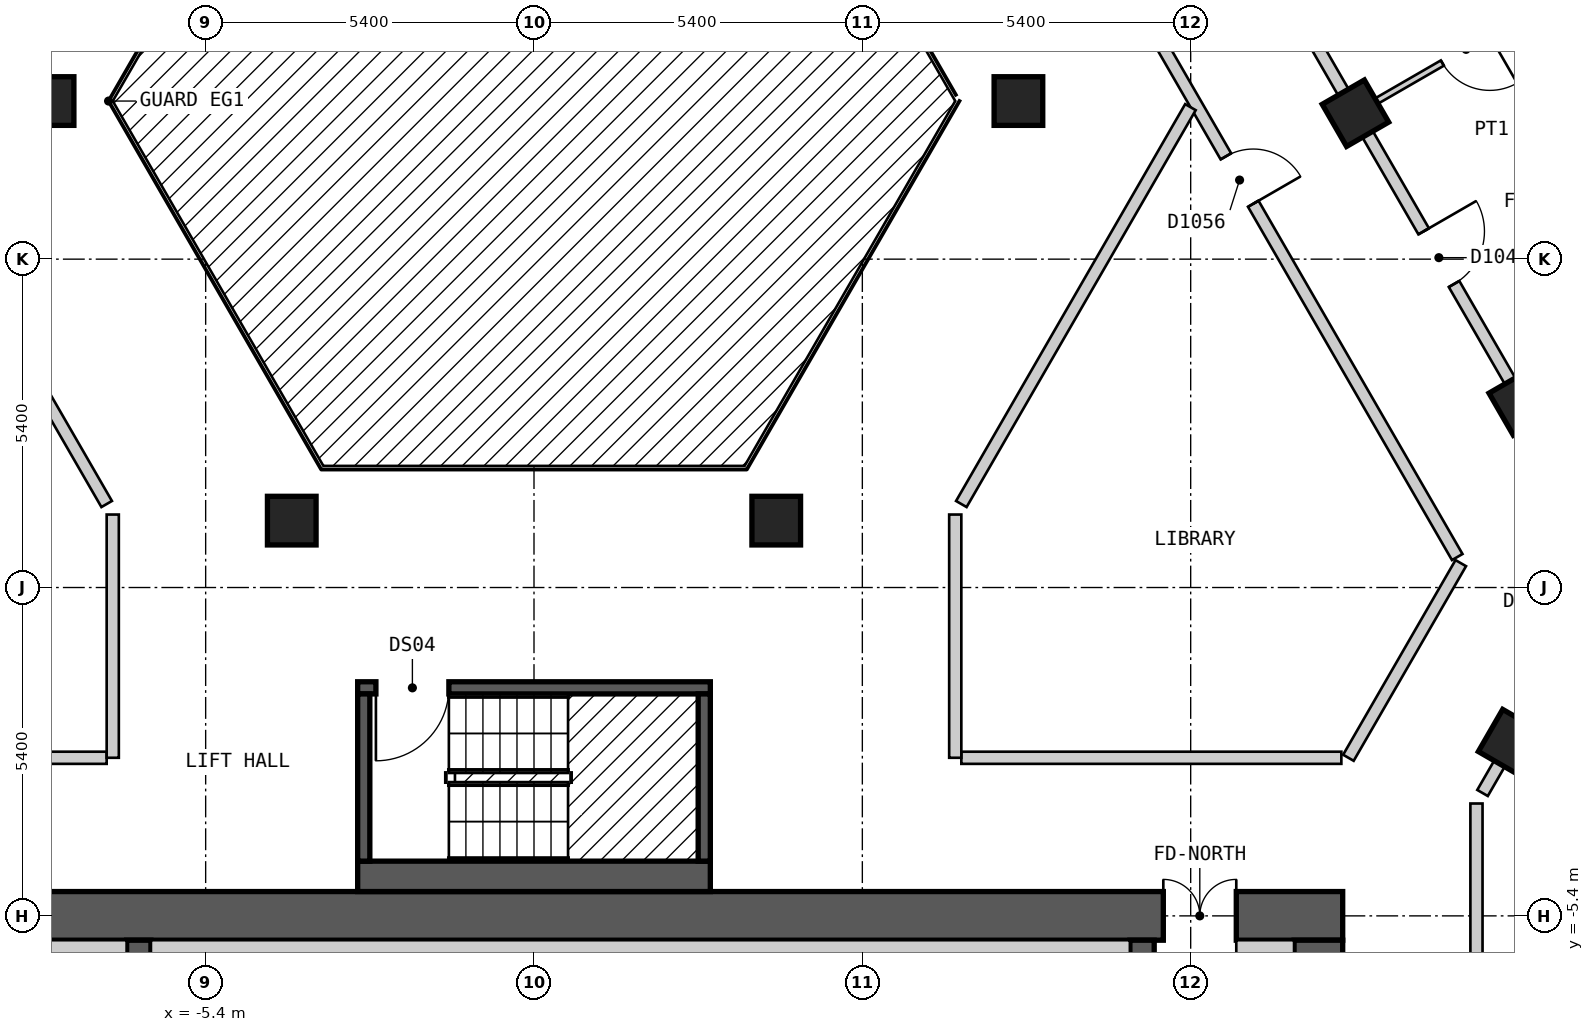
"""IFC4 building model, lengths in metres.
Left out: names, types, materials, properties, quantities, classifications, styles, units other than length and angle.
Written with IfcOpenShell. Run it as: python <this file> out.ifc"""

import sys

from ifc_helpers import new_model, si_unit, direction, frame, frame_2d, origin, origin_2d, place, context, subcontext, project, spatial, polyline, rectangle, outline, extrude, element, fill, save


model = new_model("IFC4")
c1 = context("Model", 3, precision=1e-05, world=origin(), true_north=direction((0.0, 1.0)))
c2 = subcontext(c1, "Body", "Model", "MODEL_VIEW")
j1 = project(units=[si_unit("LENGTHUNIT", "METRE"), si_unit("PLANEANGLEUNIT", "RADIAN")], contexts=[c1])
p1 = place(None, origin())
s1 = spatial("IfcSite", under=j1, at=p1, CompositionType="ELEMENT")
p2 = place(p1, origin())
s2 = spatial("IfcBuilding", under=s1, at=p2, CompositionType="ELEMENT")
p3 = place(p2, frame((0.0, 0.0, 120.6)))
s3 = spatial("IfcBuildingStorey", under=s2, at=p3, CompositionType="ELEMENT", Elevation=120.6)
for number, where, z_axis, x_axis in (
    (1, (16.078, -2.551, 0.0), (0.0, 0.0, 1.0), (0.5, 0.866, 0.0)),
    (2, (16.253, 3.05, 0.0), (0.0, 0.0, 1.0), (-0.5, 0.866, 0.0)),
    (3, (3.984, 1.1, 0.0), (0.0, 0.0, 1.0), (1.0, 0.0, 0.0)),
    (4, (13.51, 7.8, 0.0), (0.0, 0.0, 1.0), (-0.5, 0.866, 0.0)),
    (5, (7.967, 8.0, 0.0), (0.0, 0.0, 1.0), (1.0, 0.0, 0.0)),
    (6, (-7.967, 8.0, 0.0), (0.0, 0.0, 1.0), (1.0, 0.0, 0.0)),
    (7, (-3.984, 1.1, 0.0), (0.0, 0.0, 1.0), (1.0, 0.0, 0.0)),
):
    element("IfcColumn", number, at=place(p3, frame(where, z_axis=z_axis, x_axis=x_axis)), inside=s3, PredefinedType="COLUMN", context=c2, shape_type="SweptSolid", body=[
        extrude(rectangle(XDim=0.8, YDim=0.8, at=origin_2d()), origin(), (0.0, 0.0, 1.0), 3.0),
    ])
p4 = place(p3, frame((-13.3, -5.4, 0.0), z_axis=(0.0, 0.0, 1.0), x_axis=(1.0, 0.0, 0.0)))
e8 = element("IfcWall", 8, at=p4, inside=s3, PredefinedType="SHEAR", context=c2, shape_type="SweptSolid", body=[
    extrude(rectangle(XDim=26.6, YDim=0.8, at=frame_2d((13.3, 0.0))), origin(), (0.0, 0.0, 1.0), 2.7),
])
p5 = place(p4, frame((23.65, 0.0, 0.0)))
e9 = element("IfcOpeningElement", 9, at=p5, cuts=e8, PredefinedType="OPENING", context=c2, shape_type="SweptSolid", body=[
    extrude(rectangle(XDim=1.2, YDim=2.1, at=frame_2d((0.6, 1.05))), frame((0.0, 0.41, 0.0), z_axis=(0.0, -1.0, 0.0), x_axis=(1.0, 0.0, 0.0)), (0.0, 0.0, 1.0), 0.82),
])
p6 = place(p3, frame((12.9, -18.2, 0.0), z_axis=(0.0, 0.0, 1.0), x_axis=(0.0, 1.0, 0.0)))
e10 = element("IfcWall", 10, at=p6, inside=s3, PredefinedType="SHEAR", context=c2, shape_type="SweptSolid", body=[
    extrude(rectangle(XDim=12.4, YDim=0.8, at=frame_2d((6.2, 0.0))), origin(), (0.0, 0.0, 1.0), 2.7),
])
for number, where, z_axis, x_axis in (
    (11, (-6.5, -9.15, 0.0), (0.0, 0.0, 1.0), (0.0, 1.0, 0.0)),
    (12, (10.0, -9.15, 0.0), (0.0, 0.0, 1.0), (0.0, 1.0, 0.0)),
):
    element("IfcWall", number, at=place(p3, frame(where, z_axis=z_axis, x_axis=x_axis)), inside=s3, PredefinedType="SHEAR", context=c2, shape_type="SweptSolid", body=[
        extrude(rectangle(XDim=3.35, YDim=0.4, at=frame_2d((1.675, 0.0))), origin(), (0.0, 0.0, 1.0), 2.7),
    ])
p7 = place(p3, frame((15.862, -23.425, 0.0), z_axis=(0.0, 0.0, 1.0), x_axis=(0.500017503135, 0.866015298109, 0.0)))
e13 = element("IfcWall", 13, at=p7, inside=s3, PredefinedType="SOLIDWALL", context=c2, shape_type="SweptSolid", body=[
    extrude(outline(polyline([(0.0, -0.15), (24.711, -0.15), (24.631, 0.15), (0.08, 0.15), (0.0, -0.15)])), origin(), (0.0, 0.0, 1.0), 2.7),
])
p8 = place(p7, frame((1.4, 0.0, 0.15)))
e14 = element("IfcOpeningElement", 14, at=p8, cuts=e13, PredefinedType="OPENING", context=c2, shape_type="SweptSolid", body=[
    extrude(rectangle(XDim=1.5, YDim=2.1, at=frame_2d((0.75, 1.05))), frame((0.0, 0.16, 0.0), z_axis=(0.0, -1.0, 0.0), x_axis=(1.0, 0.0, 0.0)), (0.0, 0.0, 1.0), 0.32),
])
p9 = place(p7, frame((4.316, 0.0, 0.15)))
e15 = element("IfcOpeningElement", 15, at=p9, cuts=e13, PredefinedType="OPENING", context=c2, shape_type="SweptSolid", body=[
    extrude(rectangle(XDim=1.5, YDim=2.1, at=frame_2d((0.75, 1.05))), frame((0.0, 0.16, 0.0), z_axis=(0.0, -1.0, 0.0), x_axis=(1.0, 0.0, 0.0)), (0.0, 0.0, 1.0), 0.32),
])
p10 = place(p7, frame((7.231, 0.0, 0.15)))
e16 = element("IfcOpeningElement", 16, at=p10, cuts=e13, PredefinedType="OPENING", context=c2, shape_type="SweptSolid", body=[
    extrude(rectangle(XDim=1.5, YDim=2.1, at=frame_2d((0.75, 1.05))), frame((0.0, 0.16, 0.0), z_axis=(0.0, -1.0, 0.0), x_axis=(1.0, 0.0, 0.0)), (0.0, 0.0, 1.0), 0.32),
])
p11 = place(p7, frame((10.147, 0.0, 0.15)))
e17 = element("IfcOpeningElement", 17, at=p11, cuts=e13, PredefinedType="OPENING", context=c2, shape_type="SweptSolid", body=[
    extrude(rectangle(XDim=1.5, YDim=2.1, at=frame_2d((0.75, 1.05))), frame((0.0, 0.16, 0.0), z_axis=(0.0, -1.0, 0.0), x_axis=(1.0, 0.0, 0.0)), (0.0, 0.0, 1.0), 0.32),
])
p12 = place(p7, frame((13.062, 0.0, 0.15)))
e18 = element("IfcOpeningElement", 18, at=p12, cuts=e13, PredefinedType="OPENING", context=c2, shape_type="SweptSolid", body=[
    extrude(rectangle(XDim=1.5, YDim=2.1, at=frame_2d((0.75, 1.05))), frame((0.0, 0.16, 0.0), z_axis=(0.0, -1.0, 0.0), x_axis=(1.0, 0.0, 0.0)), (0.0, 0.0, 1.0), 0.32),
])
p13 = place(p7, frame((15.977, 0.0, 0.15)))
e19 = element("IfcOpeningElement", 19, at=p13, cuts=e13, PredefinedType="OPENING", context=c2, shape_type="SweptSolid", body=[
    extrude(rectangle(XDim=1.5, YDim=2.1, at=frame_2d((0.75, 1.05))), frame((0.0, 0.16, 0.0), z_axis=(0.0, -1.0, 0.0), x_axis=(1.0, 0.0, 0.0)), (0.0, 0.0, 1.0), 0.32),
])
p14 = place(p7, frame((18.893, 0.0, 0.15)))
e20 = element("IfcOpeningElement", 20, at=p14, cuts=e13, PredefinedType="OPENING", context=c2, shape_type="SweptSolid", body=[
    extrude(rectangle(XDim=1.5, YDim=2.1, at=frame_2d((0.75, 1.05))), frame((0.0, 0.16, 0.0), z_axis=(0.0, -1.0, 0.0), x_axis=(1.0, 0.0, 0.0)), (0.0, 0.0, 1.0), 0.32),
])
p15 = place(p7, frame((21.809, 0.0, 0.15)))
e21 = element("IfcOpeningElement", 21, at=p15, cuts=e13, PredefinedType="OPENING", context=c2, shape_type="SweptSolid", body=[
    extrude(rectangle(XDim=1.5, YDim=2.1, at=frame_2d((0.75, 1.05))), frame((0.0, 0.16, 0.0), z_axis=(0.0, -1.0, 0.0), x_axis=(1.0, 0.0, 0.0)), (0.0, 0.0, 1.0), 0.32),
])
p16 = place(p3, frame((-2.9, -4.75, 0.0), z_axis=(0.0, 0.0, 1.0), x_axis=(1.0, 0.0, 0.0)))
e22 = element("IfcWall", 22, at=p16, inside=s3, PredefinedType="SOLIDWALL", context=c2, shape_type="SweptSolid", body=[
    extrude(rectangle(XDim=5.8, YDim=0.5, at=frame_2d((2.9, 0.0))), origin(), (0.0, 0.0, 1.0), 2.7),
])
p17 = place(p3, frame((-2.9, -1.65, 0.0), z_axis=(0.0, 0.0, 1.0), x_axis=(1.0, 0.0, 0.0)))
e23 = element("IfcWall", 23, at=p17, inside=s3, PredefinedType="SOLIDWALL", context=c2, shape_type="SweptSolid", body=[
    extrude(rectangle(XDim=5.8, YDim=0.2, at=frame_2d((2.9, 0.0))), origin(), (0.0, 0.0, 1.0), 2.7),
])
p18 = place(p17, frame((0.3, 0.0, 0.0)))
e24 = element("IfcOpeningElement", 24, at=p18, cuts=e23, PredefinedType="OPENING", context=c2, shape_type="SweptSolid", body=[
    extrude(rectangle(XDim=1.2, YDim=2.1, at=frame_2d((0.6, 1.05))), frame((0.0, 0.11, 0.0), z_axis=(0.0, -1.0, 0.0), x_axis=(1.0, 0.0, 0.0)), (0.0, 0.0, 1.0), 0.22),
])
for number, where, z_axis, x_axis in (
    (25, (-2.8, -4.5, 0.0), (0.0, 0.0, 1.0), (0.0, 1.0, 0.0)),
    (26, (2.8, -4.5, 0.0), (0.0, 0.0, 1.0), (0.0, 1.0, 0.0)),
):
    element("IfcWall", number, at=place(p3, frame(where, z_axis=z_axis, x_axis=x_axis)), inside=s3, PredefinedType="SOLIDWALL", context=c2, shape_type="SweptSolid", body=[
        extrude(rectangle(XDim=2.75, YDim=0.2, at=frame_2d((1.375, 0.0))), origin(), (0.0, 0.0, 1.0), 2.7),
    ])
p19 = place(p3, frame((-10.796, 7.9, 0.0), z_axis=(0.0, 0.0, 1.0), x_axis=(0.499954271211, -0.866051803703, 0.0)))
e27 = element("IfcWall", 27, at=p19, inside=s3, PredefinedType="PARTITIONING", context=c2, shape_type="SweptSolid", body=[
    extrude(rectangle(XDim=7.536, YDim=0.2, at=frame_2d((3.768, 0.0))), origin(), (0.0, 0.0, 1.0), 2.7),
])
p20 = place(p3, frame((7.967, 13.0, 0.0), z_axis=(0.0, 0.0, 1.0), x_axis=(0.50003774998, -0.866003607726, 0.0)))
e28 = element("IfcWall", 28, at=p20, inside=s3, PredefinedType="PARTITIONING", context=c2, shape_type="SweptSolid", body=[
    extrude(rectangle(XDim=14.433, YDim=0.2, at=frame_2d((7.217, 0.0))), origin(), (0.0, 0.0, 1.0), 2.7),
])
p21 = place(p20, frame((6.824, 0.0, 0.0)))
e29 = element("IfcOpeningElement", 29, at=p21, cuts=e28, PredefinedType="OPENING", context=c2, shape_type="SweptSolid", body=[
    extrude(rectangle(XDim=0.9, YDim=2.1, at=frame_2d((0.45, 1.05))), frame((0.0, 0.11, 0.0), z_axis=(0.0, -1.0, 0.0), x_axis=(1.0, 0.0, 0.0)), (0.0, 0.0, 1.0), 0.22),
])
p22 = place(p3, frame((9.296, 15.1, 0.0), z_axis=(0.0, 0.0, 1.0), x_axis=(0.499974024244, -0.866040400375, 0.0)))
e30 = element("IfcWall", 30, at=p22, inside=s3, PredefinedType="PARTITIONING", context=c2, shape_type="SweptSolid", body=[
    extrude(rectangle(XDim=16.857, YDim=0.2, at=frame_2d((8.429, 0.0))), origin(), (0.0, 0.0, 1.0), 2.7),
])
p23 = place(p22, frame((10.672, 0.0, 0.0)))
e31 = element("IfcOpeningElement", 31, at=p23, cuts=e30, PredefinedType="OPENING", context=c2, shape_type="SweptSolid", body=[
    extrude(rectangle(XDim=1.0, YDim=2.1, at=frame_2d((0.5, 1.05))), frame((0.0, 0.11, 0.0), z_axis=(0.0, -1.0, 0.0), x_axis=(1.0, 0.0, 0.0)), (0.0, 0.0, 1.0), 0.22),
])
p24 = place(p3, frame((-13.395, -2.8, 0.0), z_axis=(0.0, 0.0, 1.0), x_axis=(1.0, 0.0, 0.0)))
e32 = element("IfcWall", 32, at=p24, inside=s3, PredefinedType="PARTITIONING", context=c2, shape_type="SweptSolid", body=[
    extrude(rectangle(XDim=6.367, YDim=0.2, at=frame_2d((3.184, 0.0))), origin(), (0.0, 0.0, 1.0), 2.7),
])
p25 = place(p3, frame((7.028, -2.8, 0.0), z_axis=(0.0, 0.0, 1.0), x_axis=(1.0, 0.0, 0.0)))
e33 = element("IfcWall", 33, at=p25, inside=s3, PredefinedType="PARTITIONING", context=c2, shape_type="SweptSolid", body=[
    extrude(rectangle(XDim=6.25, YDim=0.2, at=frame_2d((3.125, 0.0))), origin(), (0.0, 0.0, 1.0), 2.7),
])
p26 = place(p3, frame((7.028, 1.373, 0.0), z_axis=(0.0, 0.0, 1.0), x_axis=(0.499954271211, 0.866051803703, 0.0)))
e34 = element("IfcWall", 34, at=p26, inside=s3, PredefinedType="PARTITIONING", context=c2, shape_type="SweptSolid", body=[
    extrude(rectangle(XDim=7.536, YDim=0.2, at=frame_2d((3.768, 0.0))), origin(), (0.0, 0.0, 1.0), 2.7),
])
p27 = place(p3, frame((13.394, -2.8, 0.0), z_axis=(0.0, 0.0, 1.0), x_axis=(0.499968324138, 0.866043691079, 0.0)))
e35 = element("IfcWall", 35, at=p27, inside=s3, PredefinedType="PARTITIONING", context=c2, shape_type="SweptSolid", body=[
    extrude(rectangle(XDim=3.696, YDim=0.2, at=frame_2d((1.848, 0.0))), origin(), (0.0, 0.0, 1.0), 2.7),
])
p28 = place(p3, frame((15.6, -3.379, 0.0), z_axis=(0.0, 0.0, 1.0), x_axis=(0.499896543382, 0.866085126252, 0.0)))
e36 = element("IfcWall", 36, at=p28, inside=s3, PredefinedType="PARTITIONING", context=c2, shape_type="SweptSolid", body=[
    extrude(rectangle(XDim=4.249, YDim=0.2, at=frame_2d((2.125, 0.0))), origin(), (0.0, 0.0, 1.0), 2.7),
])
p29 = place(p28, frame((3.232, 0.0, 0.0)))
e37 = element("IfcOpeningElement", 37, at=p29, cuts=e36, PredefinedType="OPENING", context=c2, shape_type="SweptSolid", body=[
    extrude(rectangle(XDim=0.8, YDim=2.1, at=frame_2d((0.4, 1.05))), frame((0.0, 0.11, 0.0), z_axis=(0.0, -1.0, 0.0), x_axis=(1.0, 0.0, 0.0)), (0.0, 0.0, 1.0), 0.22),
])
p30 = place(p3, frame((6.928, -2.8, 0.0), z_axis=(0.0, 0.0, 1.0), x_axis=(0.0, 1.0, 0.0)))
e38 = element("IfcWall", 38, at=p30, inside=s3, PredefinedType="PARTITIONING", context=c2, shape_type="SweptSolid", body=[
    extrude(rectangle(XDim=4.0, YDim=0.2, at=frame_2d((2.0, 0.0))), origin(), (0.0, 0.0, 1.0), 2.7),
])
p31 = place(p3, frame((15.5, -21.2, 0.0), z_axis=(0.0, 0.0, 1.0), x_axis=(0.0, 1.0, 0.0)))
e39 = element("IfcWall", 39, at=p31, inside=s3, PredefinedType="PARTITIONING", context=c2, shape_type="SweptSolid", body=[
    extrude(rectangle(XDim=17.648, YDim=0.2, at=frame_2d((8.824, 0.0))), origin(), (0.0, 0.0, 1.0), 2.7),
])
p32 = place(p31, frame((7.575, 0.0, 0.0)))
e40 = element("IfcOpeningElement", 40, at=p32, cuts=e39, PredefinedType="OPENING", context=c2, shape_type="SweptSolid", body=[
    extrude(rectangle(XDim=1.0, YDim=2.1, at=frame_2d((0.5, 1.05))), frame((0.0, 0.11, 0.0), z_axis=(0.0, -1.0, 0.0), x_axis=(1.0, 0.0, 0.0)), (0.0, 0.0, 1.0), 0.22),
])
p33 = place(p3, frame((-6.928, -2.8, 0.0), z_axis=(0.0, 0.0, 1.0), x_axis=(0.0, 1.0, 0.0)))
e41 = element("IfcWall", 41, at=p33, inside=s3, PredefinedType="PARTITIONING", context=c2, shape_type="SweptSolid", body=[
    extrude(rectangle(XDim=4.0, YDim=0.2, at=frame_2d((2.0, 0.0))), origin(), (0.0, 0.0, 1.0), 2.7),
])
p34 = place(p3, frame((14.455, 14.563, 0.0), z_axis=(0.0, 0.0, 1.0), x_axis=(0.500009803579, -0.866019743612, 0.0)))
e42 = element("IfcWall", 42, at=p34, inside=s3, PredefinedType="PARTITIONING", context=c2, shape_type="SweptSolid", body=[
    extrude(rectangle(XDim=16.254, YDim=0.1, at=frame_2d((8.127, 0.0))), origin(), (0.0, 0.0, 1.0), 2.7),
])
p35 = place(p34, frame((7.677, 0.0, 0.0)))
e43 = element("IfcOpeningElement", 43, at=p35, cuts=e42, PredefinedType="OPENING", context=c2, shape_type="SweptSolid", body=[
    extrude(rectangle(XDim=0.9, YDim=2.1, at=frame_2d((0.45, 1.05))), frame((0.0, 0.06, 0.0), z_axis=(0.0, -1.0, 0.0), x_axis=(1.0, 0.0, 0.0)), (0.0, 0.0, 1.0), 0.12),
])
p36 = place(p3, frame((13.597, 7.85, 0.0), z_axis=(0.0, 0.0, 1.0), x_axis=(0.866006068523, 0.500033488159, 0.0)))
e44 = element("IfcWall", 44, at=p36, inside=s3, PredefinedType="PARTITIONING", context=c2, shape_type="SweptSolid", body=[
    extrude(rectangle(XDim=4.099, YDim=0.1, at=frame_2d((2.05, 0.0))), origin(), (0.0, 0.0, 1.0), 2.7),
])
p37 = place(p36, frame((1.55, 0.0, 0.0)))
e45 = element("IfcOpeningElement", 45, at=p37, cuts=e44, PredefinedType="OPENING", context=c2, shape_type="SweptSolid", body=[
    extrude(rectangle(XDim=0.9, YDim=2.1, at=frame_2d((0.45, 1.05))), frame((0.0, 0.06, 0.0), z_axis=(0.0, -1.0, 0.0), x_axis=(1.0, 0.0, 0.0)), (0.0, 0.0, 1.0), 0.12),
])
p38 = place(p3, frame((-12.1, -6.0, 0.0), z_axis=(0.0, 0.0, 1.0), x_axis=(1.0, 0.0, 0.0)))
e46 = element("IfcWall", 46, at=p38, inside=s3, PredefinedType="SOLIDWALL", context=c2, shape_type="SweptSolid", body=[
    extrude(rectangle(XDim=5.4, YDim=0.4, at=frame_2d((2.7, 0.0))), origin(), (0.0, 0.0, 1.0), 2.7),
])
p39 = place(p3, frame((-6.3, -6.0, 0.0), z_axis=(0.0, 0.0, 1.0), x_axis=(1.0, 0.0, 0.0)))
e47 = element("IfcWall", 47, at=p39, inside=s3, PredefinedType="SOLIDWALL", context=c2, shape_type="SweptSolid", body=[
    extrude(rectangle(XDim=16.1, YDim=0.4, at=frame_2d((8.05, 0.0))), origin(), (0.0, 0.0, 1.0), 2.7),
])
p40 = place(p3, frame((11.55, -6.0, 0.0), z_axis=(0.0, 0.0, 1.0), x_axis=(1.0, 0.0, 0.0)))
e48 = element("IfcWall", 48, at=p40, inside=s3, PredefinedType="PARTITIONING", context=c2, shape_type="SweptSolid", body=[
    extrude(rectangle(XDim=0.95, YDim=0.4, at=frame_2d((0.475, 0.0))), origin(), (0.0, 0.0, 1.0), 2.7),
])
p41 = place(p18, origin())
e49 = element("IfcDoor", 49, at=p41, inside=s3, OperationType="SINGLE_SWING_LEFT", PredefinedType="DOOR", context=c2, shape_type="SweptSolid", body=[
    extrude(rectangle(XDim=1.2, YDim=2.1, at=frame_2d((0.6, 1.05))), frame((0.0, 0.025, 0.0), z_axis=(0.0, -1.0, 0.0), x_axis=(1.0, 0.0, 0.0)), (0.0, 0.0, 1.0), 0.05),
])
fill(e24, e49)
p42 = place(p23, origin())
e50 = element("IfcDoor", 50, at=p42, inside=s3, OperationType="SINGLE_SWING_LEFT", PredefinedType="DOOR", context=c2, shape_type="SweptSolid", body=[
    extrude(rectangle(XDim=1.0, YDim=2.1, at=frame_2d((0.5, 1.05))), frame((0.0, 0.025, 0.0), z_axis=(0.0, -1.0, 0.0), x_axis=(1.0, 0.0, 0.0)), (0.0, 0.0, 1.0), 0.05),
])
fill(e31, e50)
p43 = place(p37, origin())
e51 = element("IfcDoor", 51, at=p43, inside=s3, OperationType="SINGLE_SWING_RIGHT", PredefinedType="DOOR", context=c2, shape_type="SweptSolid", body=[
    extrude(rectangle(XDim=0.9, YDim=2.1, at=frame_2d((0.45, 1.05))), frame((0.0, 0.025, 0.0), z_axis=(0.0, -1.0, 0.0), x_axis=(1.0, 0.0, 0.0)), (0.0, 0.0, 1.0), 0.05),
])
fill(e45, e51)
p44 = place(p21, origin())
e52 = element("IfcDoor", 52, at=p44, inside=s3, OperationType="SINGLE_SWING_RIGHT", PredefinedType="DOOR", context=c2, shape_type="SweptSolid", body=[
    extrude(rectangle(XDim=0.9, YDim=2.1, at=frame_2d((0.45, 1.05))), frame((0.0, 0.025, 0.0), z_axis=(0.0, -1.0, 0.0), x_axis=(1.0, 0.0, 0.0)), (0.0, 0.0, 1.0), 0.05),
])
fill(e29, e52)
p45 = place(p5, origin())
e53 = element("IfcDoor", 53, at=p45, inside=s3, OperationType="DOUBLE_DOOR_SINGLE_SWING", PredefinedType="DOOR", context=c2, shape_type="SweptSolid", body=[
    extrude(rectangle(XDim=1.2, YDim=2.1, at=frame_2d((0.6, 1.05))), frame((0.0, 0.025, 0.0), z_axis=(0.0, -1.0, 0.0), x_axis=(1.0, 0.0, 0.0)), (0.0, 0.0, 1.0), 0.05),
])
fill(e9, e53)
save(model, sys.argv[1])
